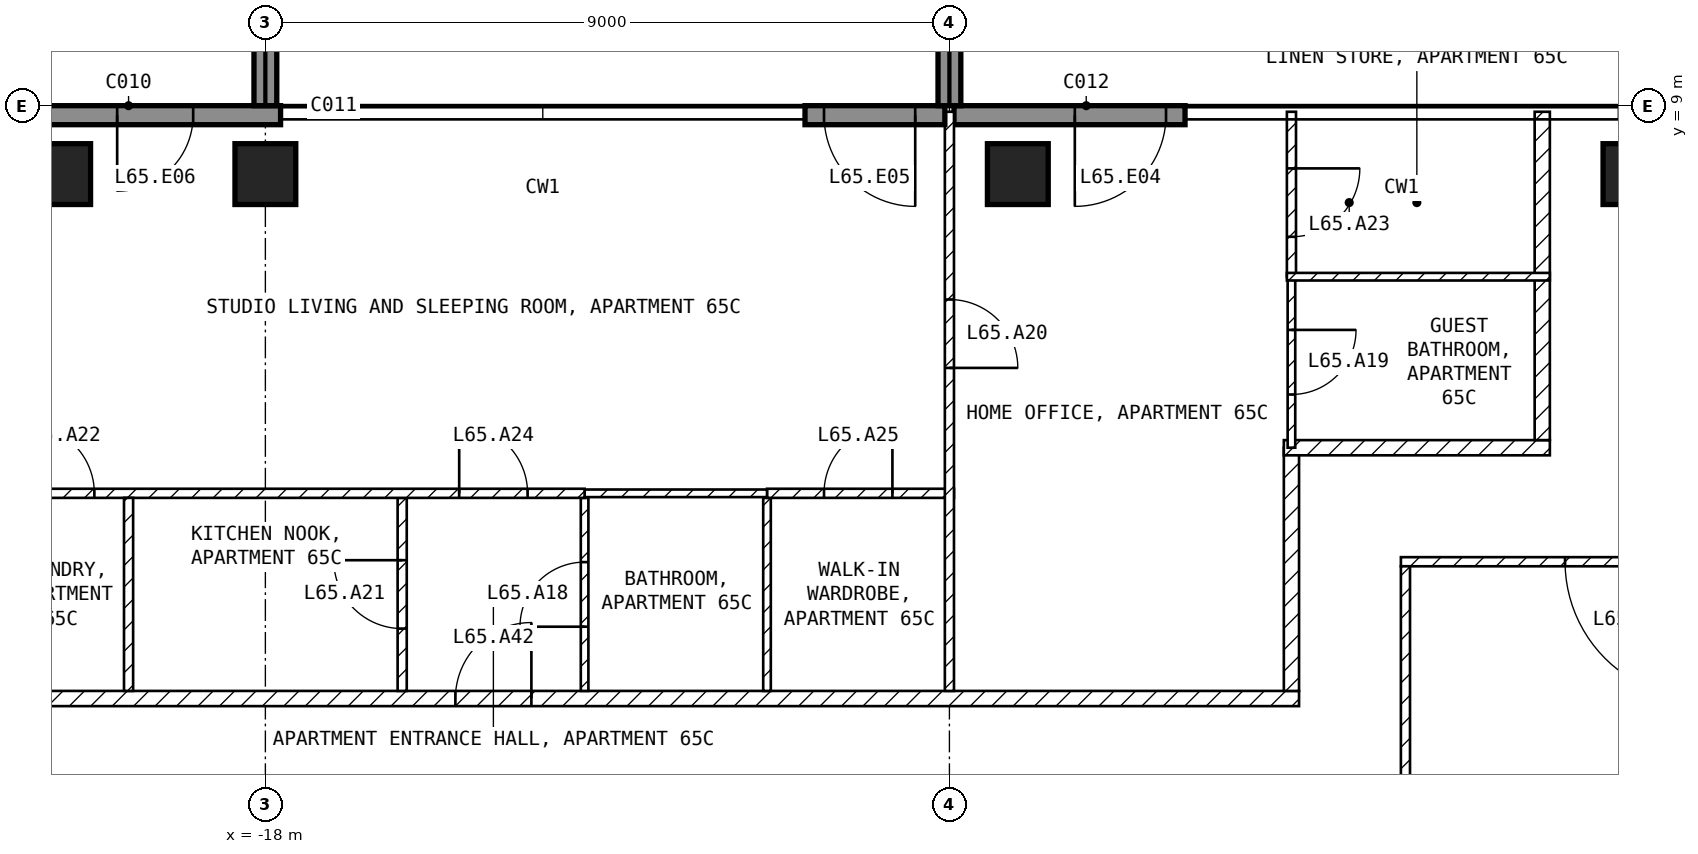
"""IFC4 building model, lengths in metres.
Left out: names, types, materials, properties, quantities, classifications, styles, units other than length and angle.
Written with IfcOpenShell. Run it as: python <this file> out.ifc"""

import sys

from ifc_helpers import new_model, si_unit, direction, frame, frame_2d, origin, origin_2d, place, context, subcontext, project, spatial, rectangle, extrude, element, fill, save


model = new_model("IFC4")
c1 = context("Model", 3, precision=1e-05, world=origin(), true_north=direction((0.0, 1.0)))
c2 = subcontext(c1, "Body", "Model", "MODEL_VIEW")
j1 = project(units=[si_unit("LENGTHUNIT", "METRE"), si_unit("PLANEANGLEUNIT", "RADIAN")], contexts=[c1])
p1 = place(None, origin())
s1 = spatial("IfcSite", under=j1, at=p1, CompositionType="ELEMENT")
p2 = place(p1, origin())
s2 = spatial("IfcBuilding", under=s1, at=p2, CompositionType="ELEMENT")
p3 = place(p2, frame((0.0, 0.0, 257.0)))
s3 = spatial("IfcBuildingStorey", under=s2, at=p3, CompositionType="ELEMENT", Elevation=257.0)
for number, where, z_axis, x_axis in (
    (1, (-20.7, 8.1, -0.25), (0.0, 0.0, 1.0), (1.0, 0.0, 0.0)),
    (2, (-18.0, 8.1, -0.25), (0.0, 0.0, 1.0), (1.0, 0.0, 0.0)),
    (3, (-8.1, 8.1, -0.25), (0.0, 0.0, 1.0), (1.0, 0.0, 0.0)),
    (4, (0.0, 8.1, -0.25), (0.0, 0.0, 1.0), (1.0, 0.0, 0.0)),
):
    element("IfcColumn", number, at=place(p3, frame(where, z_axis=z_axis, x_axis=x_axis)), inside=s3, PredefinedType="COLUMN", context=c2, shape_type="SweptSolid", body=[
        extrude(rectangle(XDim=0.8, YDim=0.8, at=origin_2d()), origin(), (0.0, 0.0, 1.0), 3.5),
    ])
p4 = place(p3, frame((-5.9, 8.875, 0.0), z_axis=(0.0, 0.0, 1.0), x_axis=(-1.0, 0.0, 0.0)))
e5 = element("IfcWall", 5, at=p4, inside=s3, PredefinedType="SOLIDWALL", context=c2, shape_type="SweptSolid", body=[
    extrude(rectangle(XDim=3.04, YDim=0.25, at=frame_2d((1.52, 0.0))), origin(), (0.0, 0.0, 1.0), 3.25),
])
p5 = place(p4, frame((0.25, 0.0, 0.0)))
e6 = element("IfcOpeningElement", 6, at=p5, cuts=e5, PredefinedType="OPENING", context=c2, shape_type="SweptSolid", body=[
    extrude(rectangle(XDim=1.2, YDim=2.4, at=frame_2d((0.6, 1.2))), frame((0.0, 0.135, 0.0), z_axis=(0.0, -1.0, 0.0), x_axis=(1.0, 0.0, 0.0)), (0.0, 0.0, 1.0), 0.27),
])
p6 = place(p3, frame((-9.06, 8.875, 0.0), z_axis=(0.0, 0.0, 1.0), x_axis=(-1.0, 0.0, 0.0)))
e7 = element("IfcWall", 7, at=p6, inside=s3, PredefinedType="SOLIDWALL", context=c2, shape_type="SweptSolid", body=[
    extrude(rectangle(XDim=1.84, YDim=0.25, at=frame_2d((0.92, 0.0))), origin(), (0.0, 0.0, 1.0), 3.25),
])
p7 = place(p6, frame((0.39, 0.0, 0.0)))
e8 = element("IfcOpeningElement", 8, at=p7, cuts=e7, PredefinedType="OPENING", context=c2, shape_type="SweptSolid", body=[
    extrude(rectangle(XDim=1.2, YDim=2.4, at=frame_2d((0.6, 1.2))), frame((0.0, 0.135, 0.0), z_axis=(0.0, -1.0, 0.0), x_axis=(1.0, 0.0, 0.0)), (0.0, 0.0, 1.0), 0.27),
])
p8 = place(p3, frame((-17.8, 8.875, 0.0), z_axis=(0.0, 0.0, 1.0), x_axis=(-1.0, 0.0, 0.0)))
e9 = element("IfcWall", 9, at=p8, inside=s3, PredefinedType="SOLIDWALL", context=c2, shape_type="SweptSolid", body=[
    extrude(rectangle(XDim=3.3, YDim=0.25, at=frame_2d((1.65, 0.0))), origin(), (0.0, 0.0, 1.0), 3.25),
])
p9 = place(p8, frame((1.15, 0.0, 0.0)))
e10 = element("IfcOpeningElement", 10, at=p9, cuts=e9, PredefinedType="OPENING", context=c2, shape_type="SweptSolid", body=[
    extrude(rectangle(XDim=1.0, YDim=2.4, at=frame_2d((0.5, 1.2))), frame((0.0, 0.135, 0.0), z_axis=(0.0, -1.0, 0.0), x_axis=(1.0, 0.0, 0.0)), (0.0, 0.0, 1.0), 0.27),
])
for number, where, z_axis, x_axis in (
    (11, (-18.0, 9.0, 0.0), (0.0, 0.0, 1.0), (0.0, 1.0, 0.0)),
    (12, (-9.0, 9.0, 0.0), (0.0, 0.0, 1.0), (0.0, 1.0, 0.0)),
):
    element("IfcWall", number, at=place(p3, frame(where, z_axis=z_axis, x_axis=x_axis)), inside=s3, PredefinedType="SOLIDWALL", context=c2, shape_type="SweptSolid", body=[
        extrude(rectangle(XDim=2.7, YDim=0.3, at=frame_2d((1.35, 0.0))), origin(), (0.0, 0.0, 1.0), 3.25),
    ])
p10 = place(p3, frame((3.06, 3.0, 0.0), z_axis=(0.0, 0.0, 1.0), x_axis=(-1.0, 0.0, 0.0)))
e13 = element("IfcWall", 13, at=p10, inside=s3, PredefinedType="PARTITIONING", context=c2, shape_type="SweptSolid", body=[
    extrude(rectangle(XDim=6.12, YDim=0.12, at=frame_2d((3.06, 0.0))), origin(), (0.0, 0.0, 1.0), 3.25),
])
p11 = place(p10, frame((2.16, 0.0, 0.0)))
e14 = element("IfcOpeningElement", 14, at=p11, cuts=e13, PredefinedType="OPENING", context=c2, shape_type="SweptSolid", body=[
    extrude(rectangle(XDim=1.8, YDim=2.1, at=frame_2d((0.9, 1.05))), frame((0.0, 0.07, 0.0), z_axis=(0.0, -1.0, 0.0), x_axis=(1.0, 0.0, 0.0)), (0.0, 0.0, 1.0), 0.14),
])
p12 = place(p3, frame((-3.0, 2.94, 0.0), z_axis=(0.0, 0.0, 1.0), x_axis=(0.0, -1.0, 0.0)))
e15 = element("IfcWall", 15, at=p12, inside=s3, PredefinedType="PARTITIONING", context=c2, shape_type="SweptSolid", body=[
    extrude(rectangle(XDim=5.88, YDim=0.12, at=frame_2d((2.94, 0.0))), origin(), (0.0, 0.0, 1.0), 3.25),
])
p13 = place(p3, frame((-21.6, 1.2, 0.0), z_axis=(0.0, 0.0, 1.0), x_axis=(1.0, 0.0, 0.0)))
e16 = element("IfcWall", 16, at=p13, inside=s3, PredefinedType="PARTITIONING", context=c2, shape_type="SweptSolid", body=[
    extrude(rectangle(XDim=17.2, YDim=0.2, at=frame_2d((8.6, 0.0))), origin(), (0.0, 0.0, 1.0), 3.25),
])
p14 = place(p13, frame((6.1, 0.0, 0.0)))
e17 = element("IfcOpeningElement", 17, at=p14, cuts=e16, PredefinedType="OPENING", context=c2, shape_type="SweptSolid", body=[
    extrude(rectangle(XDim=1.0, YDim=2.1, at=frame_2d((0.5, 1.05))), frame((0.0, 0.11, 0.0), z_axis=(0.0, -1.0, 0.0), x_axis=(1.0, 0.0, 0.0)), (0.0, 0.0, 1.0), 0.22),
])
p15 = place(p3, frame((-4.5, 1.3, 0.0), z_axis=(0.0, 0.0, 1.0), x_axis=(0.0, 1.0, 0.0)))
e18 = element("IfcWall", 18, at=p15, inside=s3, PredefinedType="PARTITIONING", context=c2, shape_type="SweptSolid", body=[
    extrude(rectangle(XDim=3.2, YDim=0.2, at=frame_2d((1.6, 0.0))), origin(), (0.0, 0.0, 1.0), 3.25),
])
p16 = place(p3, frame((-4.6, 4.5, 0.0), z_axis=(0.0, 0.0, 1.0), x_axis=(1.0, 0.0, 0.0)))
e19 = element("IfcWall", 19, at=p16, inside=s3, PredefinedType="PARTITIONING", context=c2, shape_type="SweptSolid", body=[
    extrude(rectangle(XDim=3.5, YDim=0.2, at=frame_2d((1.75, 0.0))), origin(), (0.0, 0.0, 1.0), 3.25),
])
p17 = place(p3, frame((-1.2, 4.6, 0.0), z_axis=(0.0, 0.0, 1.0), x_axis=(0.0, 1.0, 0.0)))
e20 = element("IfcWall", 20, at=p17, inside=s3, PredefinedType="PARTITIONING", context=c2, shape_type="SweptSolid", body=[
    extrude(rectangle(XDim=4.32, YDim=0.2, at=frame_2d((2.16, 0.0))), origin(), (0.0, 0.0, 1.0), 3.25),
])
p18 = place(p3, frame((-11.4, 1.3, 0.0), z_axis=(0.0, 0.0, 1.0), x_axis=(0.0, 1.0, 0.0)))
e21 = element("IfcWall", 21, at=p18, inside=s3, PredefinedType="PARTITIONING", context=c2, shape_type="SweptSolid", body=[
    extrude(rectangle(XDim=2.54, YDim=0.1, at=frame_2d((1.27, 0.0))), origin(), (0.0, 0.0, 1.0), 3.25),
])
p19 = place(p3, frame((-11.4, 3.9, 0.0), z_axis=(0.0, 0.0, 1.0), x_axis=(1.0, 0.0, 0.0)))
e22 = element("IfcWall", 22, at=p19, inside=s3, PredefinedType="PARTITIONING", context=c2, shape_type="SweptSolid", body=[
    extrude(rectangle(XDim=2.46, YDim=0.12, at=frame_2d((1.23, 0.0))), origin(), (0.0, 0.0, 1.0), 3.25),
])
p20 = place(p19, frame((0.75, 0.0, 0.0)))
e23 = element("IfcOpeningElement", 23, at=p20, cuts=e22, PredefinedType="OPENING", context=c2, shape_type="SweptSolid", body=[
    extrude(rectangle(XDim=0.9, YDim=2.1, at=frame_2d((0.45, 1.05))), frame((0.0, 0.07, 0.0), z_axis=(0.0, -1.0, 0.0), x_axis=(1.0, 0.0, 0.0)), (0.0, 0.0, 1.0), 0.14),
])
p21 = place(p3, frame((-9.0, 8.92, 0.0), z_axis=(0.0, 0.0, 1.0), x_axis=(0.0, -1.0, 0.0)))
e24 = element("IfcWall", 24, at=p21, inside=s3, PredefinedType="PARTITIONING", context=c2, shape_type="SweptSolid", body=[
    extrude(rectangle(XDim=7.62, YDim=0.12, at=frame_2d((3.81, 0.0))), origin(), (0.0, 0.0, 1.0), 3.25),
])
p22 = place(p21, frame((2.47, 0.0, 0.0)))
e25 = element("IfcOpeningElement", 25, at=p22, cuts=e24, PredefinedType="OPENING", context=c2, shape_type="SweptSolid", body=[
    extrude(rectangle(XDim=0.9, YDim=2.1, at=frame_2d((0.45, 1.05))), frame((0.0, 0.07, 0.0), z_axis=(0.0, -1.0, 0.0), x_axis=(1.0, 0.0, 0.0)), (0.0, 0.0, 1.0), 0.14),
])
p23 = place(p3, frame((-13.8, 1.3, 0.0), z_axis=(0.0, 0.0, 1.0), x_axis=(0.0, 1.0, 0.0)))
e26 = element("IfcWall", 26, at=p23, inside=s3, PredefinedType="PARTITIONING", context=c2, shape_type="SweptSolid", body=[
    extrude(rectangle(XDim=2.54, YDim=0.1, at=frame_2d((1.27, 0.0))), origin(), (0.0, 0.0, 1.0), 3.25),
])
p24 = place(p23, frame((0.845, 0.0, 0.0)))
e27 = element("IfcOpeningElement", 27, at=p24, cuts=e26, PredefinedType="OPENING", context=c2, shape_type="SweptSolid", body=[
    extrude(rectangle(XDim=0.85, YDim=2.1, at=frame_2d((0.425, 1.05))), frame((0.0, 0.06, 0.0), z_axis=(0.0, -1.0, 0.0), x_axis=(1.0, 0.0, 0.0)), (0.0, 0.0, 1.0), 0.12),
])
p25 = place(p3, frame((-13.8, 3.9, 0.0), z_axis=(0.0, 0.0, 1.0), x_axis=(1.0, 0.0, 0.0)))
e28 = element("IfcWall", 28, at=p25, inside=s3, PredefinedType="PARTITIONING", context=c2, shape_type="SweptSolid", body=[
    extrude(rectangle(XDim=2.4, YDim=0.1, at=frame_2d((1.2, 0.0))), origin(), (0.0, 0.0, 1.0), 3.25),
])
p26 = place(p3, frame((-16.2, 1.3, 0.0), z_axis=(0.0, 0.0, 1.0), x_axis=(0.0, 1.0, 0.0)))
e29 = element("IfcWall", 29, at=p26, inside=s3, PredefinedType="PARTITIONING", context=c2, shape_type="SweptSolid", body=[
    extrude(rectangle(XDim=2.54, YDim=0.12, at=frame_2d((1.27, 0.0))), origin(), (0.0, 0.0, 1.0), 3.25),
])
p27 = place(p26, frame((0.82, 0.0, 0.0)))
e30 = element("IfcOpeningElement", 30, at=p27, cuts=e29, PredefinedType="OPENING", context=c2, shape_type="SweptSolid", body=[
    extrude(rectangle(XDim=0.9, YDim=2.1, at=frame_2d((0.45, 1.05))), frame((0.0, 0.07, 0.0), z_axis=(0.0, -1.0, 0.0), x_axis=(1.0, 0.0, 0.0)), (0.0, 0.0, 1.0), 0.14),
])
p28 = place(p3, frame((-21.6, 3.9, 0.0), z_axis=(0.0, 0.0, 1.0), x_axis=(1.0, 0.0, 0.0)))
e31 = element("IfcWall", 31, at=p28, inside=s3, PredefinedType="PARTITIONING", context=c2, shape_type="SweptSolid", body=[
    extrude(rectangle(XDim=7.8, YDim=0.12, at=frame_2d((3.9, 0.0))), origin(), (0.0, 0.0, 1.0), 3.25),
])
p29 = place(p28, frame((0.45, 0.0, 0.0)))
e32 = element("IfcOpeningElement", 32, at=p29, cuts=e31, PredefinedType="OPENING", context=c2, shape_type="SweptSolid", body=[
    extrude(rectangle(XDim=0.9, YDim=2.1, at=frame_2d((0.45, 1.05))), frame((0.0, 0.07, 0.0), z_axis=(0.0, -1.0, 0.0), x_axis=(1.0, 0.0, 0.0)), (0.0, 0.0, 1.0), 0.14),
])
p30 = place(p28, frame((6.15, 0.0, 0.0)))
e33 = element("IfcOpeningElement", 33, at=p30, cuts=e31, PredefinedType="OPENING", context=c2, shape_type="SweptSolid", body=[
    extrude(rectangle(XDim=0.9, YDim=2.1, at=frame_2d((0.45, 1.05))), frame((0.0, 0.07, 0.0), z_axis=(0.0, -1.0, 0.0), x_axis=(1.0, 0.0, 0.0)), (0.0, 0.0, 1.0), 0.14),
])
p31 = place(p3, frame((-19.8, 1.3, 0.0), z_axis=(0.0, 0.0, 1.0), x_axis=(0.0, 1.0, 0.0)))
e34 = element("IfcWall", 34, at=p31, inside=s3, PredefinedType="PARTITIONING", context=c2, shape_type="SweptSolid", body=[
    extrude(rectangle(XDim=2.54, YDim=0.12, at=frame_2d((1.27, 0.0))), origin(), (0.0, 0.0, 1.0), 3.25),
])
p32 = place(p3, frame((-4.5, 6.75, 0.0), z_axis=(0.0, 0.0, 1.0), x_axis=(0.0, -1.0, 0.0)))
e35 = element("IfcWall", 35, at=p32, inside=s3, PredefinedType="PARTITIONING", context=c2, shape_type="SweptSolid", body=[
    extrude(rectangle(XDim=2.25, YDim=0.1, at=frame_2d((1.125, 0.0))), origin(), (0.0, 0.0, 1.0), 3.25),
])
p33 = place(p32, frame((0.7, 0.0, 0.0)))
e36 = element("IfcOpeningElement", 36, at=p33, cuts=e35, PredefinedType="OPENING", context=c2, shape_type="SweptSolid", body=[
    extrude(rectangle(XDim=0.85, YDim=2.1, at=frame_2d((0.425, 1.05))), frame((0.0, 0.06, 0.0), z_axis=(0.0, -1.0, 0.0), x_axis=(1.0, 0.0, 0.0)), (0.0, 0.0, 1.0), 0.12),
])
p34 = place(p3, frame((-4.5, 8.92, 0.0), z_axis=(0.0, 0.0, 1.0), x_axis=(0.0, -1.0, 0.0)))
e37 = element("IfcWall", 37, at=p34, inside=s3, PredefinedType="PARTITIONING", context=c2, shape_type="SweptSolid", body=[
    extrude(rectangle(XDim=2.17, YDim=0.12, at=frame_2d((1.085, 0.0))), origin(), (0.0, 0.0, 1.0), 3.25),
])
p35 = place(p34, frame((0.745, 0.0, 0.0)))
e38 = element("IfcOpeningElement", 38, at=p35, cuts=e37, PredefinedType="OPENING", context=c2, shape_type="SweptSolid", body=[
    extrude(rectangle(XDim=0.9, YDim=2.1, at=frame_2d((0.45, 1.05))), frame((0.0, 0.07, 0.0), z_axis=(0.0, -1.0, 0.0), x_axis=(1.0, 0.0, 0.0)), (0.0, 0.0, 1.0), 0.14),
])
p36 = place(p3, frame((-4.56, 6.75, 0.0), z_axis=(0.0, 0.0, 1.0), x_axis=(1.0, 0.0, 0.0)))
e39 = element("IfcWall", 39, at=p36, inside=s3, PredefinedType="PARTITIONING", context=c2, shape_type="SweptSolid", body=[
    extrude(rectangle(XDim=3.46, YDim=0.1, at=frame_2d((1.73, 0.0))), origin(), (0.0, 0.0, 1.0), 3.25),
])
p37 = place(p5, origin())
e40 = element("IfcDoor", 40, at=p37, inside=s3, OperationType="SINGLE_SWING_RIGHT", PredefinedType="DOOR", context=c2, shape_type="SweptSolid", body=[
    extrude(rectangle(XDim=1.2, YDim=2.4, at=frame_2d((0.6, 1.2))), frame((0.0, 0.025, 0.0), z_axis=(0.0, -1.0, 0.0), x_axis=(1.0, 0.0, 0.0)), (0.0, 0.0, 1.0), 0.05),
])
fill(e6, e40)
p38 = place(p7, origin())
e41 = element("IfcDoor", 41, at=p38, inside=s3, OperationType="SINGLE_SWING_LEFT", PredefinedType="DOOR", context=c2, shape_type="SweptSolid", body=[
    extrude(rectangle(XDim=1.2, YDim=2.4, at=frame_2d((0.6, 1.2))), frame((0.0, 0.025, 0.0), z_axis=(0.0, -1.0, 0.0), x_axis=(1.0, 0.0, 0.0)), (0.0, 0.0, 1.0), 0.05),
])
fill(e8, e41)
p39 = place(p9, origin())
e42 = element("IfcDoor", 42, at=p39, inside=s3, OperationType="SINGLE_SWING_RIGHT", PredefinedType="DOOR", context=c2, shape_type="SweptSolid", body=[
    extrude(rectangle(XDim=1.0, YDim=2.4, at=frame_2d((0.5, 1.2))), frame((0.0, 0.025, 0.0), z_axis=(0.0, -1.0, 0.0), x_axis=(1.0, 0.0, 0.0)), (0.0, 0.0, 1.0), 0.05),
])
fill(e10, e42)
p40 = place(p11, origin())
e43 = element("IfcDoor", 43, at=p40, inside=s3, OperationType="SINGLE_SWING_LEFT", PredefinedType="DOOR", context=c2, shape_type="SweptSolid", body=[
    extrude(rectangle(XDim=1.8, YDim=2.1, at=frame_2d((0.9, 1.05))), frame((0.0, 0.025, 0.0), z_axis=(0.0, -1.0, 0.0), x_axis=(1.0, 0.0, 0.0)), (0.0, 0.0, 1.0), 0.05),
])
fill(e14, e43)
p41 = place(p24, origin())
e44 = element("IfcDoor", 44, at=p41, inside=s3, OperationType="SINGLE_SWING_LEFT", PredefinedType="DOOR", context=c2, shape_type="SweptSolid", body=[
    extrude(rectangle(XDim=0.85, YDim=2.1, at=frame_2d((0.425, 1.05))), frame((0.0, 0.025, 0.0), z_axis=(0.0, -1.0, 0.0), x_axis=(1.0, 0.0, 0.0)), (0.0, 0.0, 1.0), 0.05),
])
fill(e27, e44)
p42 = place(p33, origin())
e45 = element("IfcDoor", 45, at=p42, inside=s3, OperationType="SINGLE_SWING_LEFT", PredefinedType="DOOR", context=c2, shape_type="SweptSolid", body=[
    extrude(rectangle(XDim=0.85, YDim=2.1, at=frame_2d((0.425, 1.05))), frame((0.0, 0.025, 0.0), z_axis=(0.0, -1.0, 0.0), x_axis=(1.0, 0.0, 0.0)), (0.0, 0.0, 1.0), 0.05),
])
fill(e36, e45)
p43 = place(p22, origin())
e46 = element("IfcDoor", 46, at=p43, inside=s3, OperationType="SINGLE_SWING_RIGHT", PredefinedType="DOOR", context=c2, shape_type="SweptSolid", body=[
    extrude(rectangle(XDim=0.9, YDim=2.1, at=frame_2d((0.45, 1.05))), frame((0.0, 0.025, 0.0), z_axis=(0.0, -1.0, 0.0), x_axis=(1.0, 0.0, 0.0)), (0.0, 0.0, 1.0), 0.05),
])
fill(e25, e46)
p44 = place(p27, origin())
e47 = element("IfcDoor", 47, at=p44, inside=s3, OperationType="SINGLE_SWING_RIGHT", PredefinedType="DOOR", context=c2, shape_type="SweptSolid", body=[
    extrude(rectangle(XDim=0.9, YDim=2.1, at=frame_2d((0.45, 1.05))), frame((0.0, 0.025, 0.0), z_axis=(0.0, -1.0, 0.0), x_axis=(1.0, 0.0, 0.0)), (0.0, 0.0, 1.0), 0.05),
])
fill(e30, e47)
p45 = place(p29, origin())
e48 = element("IfcDoor", 48, at=p45, inside=s3, OperationType="SINGLE_SWING_LEFT", PredefinedType="DOOR", context=c2, shape_type="SweptSolid", body=[
    extrude(rectangle(XDim=0.9, YDim=2.1, at=frame_2d((0.45, 1.05))), frame((0.0, 0.025, 0.0), z_axis=(0.0, -1.0, 0.0), x_axis=(1.0, 0.0, 0.0)), (0.0, 0.0, 1.0), 0.05),
])
fill(e32, e48)
p46 = place(p35, origin())
e49 = element("IfcDoor", 49, at=p46, inside=s3, OperationType="SINGLE_SWING_LEFT", PredefinedType="DOOR", context=c2, shape_type="SweptSolid", body=[
    extrude(rectangle(XDim=0.9, YDim=2.1, at=frame_2d((0.45, 1.05))), frame((0.0, 0.025, 0.0), z_axis=(0.0, -1.0, 0.0), x_axis=(1.0, 0.0, 0.0)), (0.0, 0.0, 1.0), 0.05),
])
fill(e38, e49)
p47 = place(p30, origin())
e50 = element("IfcDoor", 50, at=p47, inside=s3, OperationType="SINGLE_SWING_LEFT", PredefinedType="DOOR", context=c2, shape_type="SweptSolid", body=[
    extrude(rectangle(XDim=0.9, YDim=2.1, at=frame_2d((0.45, 1.05))), frame((0.0, 0.025, 0.0), z_axis=(0.0, -1.0, 0.0), x_axis=(1.0, 0.0, 0.0)), (0.0, 0.0, 1.0), 0.05),
])
fill(e33, e50)
p48 = place(p20, origin())
e51 = element("IfcDoor", 51, at=p48, inside=s3, OperationType="SINGLE_SWING_RIGHT", PredefinedType="DOOR", context=c2, shape_type="SweptSolid", body=[
    extrude(rectangle(XDim=0.9, YDim=2.1, at=frame_2d((0.45, 1.05))), frame((0.0, 0.025, 0.0), z_axis=(0.0, -1.0, 0.0), x_axis=(1.0, 0.0, 0.0)), (0.0, 0.0, 1.0), 0.05),
])
fill(e23, e51)
p49 = place(p14, origin())
e52 = element("IfcDoor", 52, at=p49, inside=s3, OperationType="SINGLE_SWING_RIGHT", PredefinedType="DOOR", context=c2, shape_type="SweptSolid", body=[
    extrude(rectangle(XDim=1.0, YDim=2.1, at=frame_2d((0.5, 1.05))), frame((0.0, 0.025, 0.0), z_axis=(0.0, -1.0, 0.0), x_axis=(1.0, 0.0, 0.0)), (0.0, 0.0, 1.0), 0.05),
])
fill(e17, e52)
save(model, sys.argv[1])
